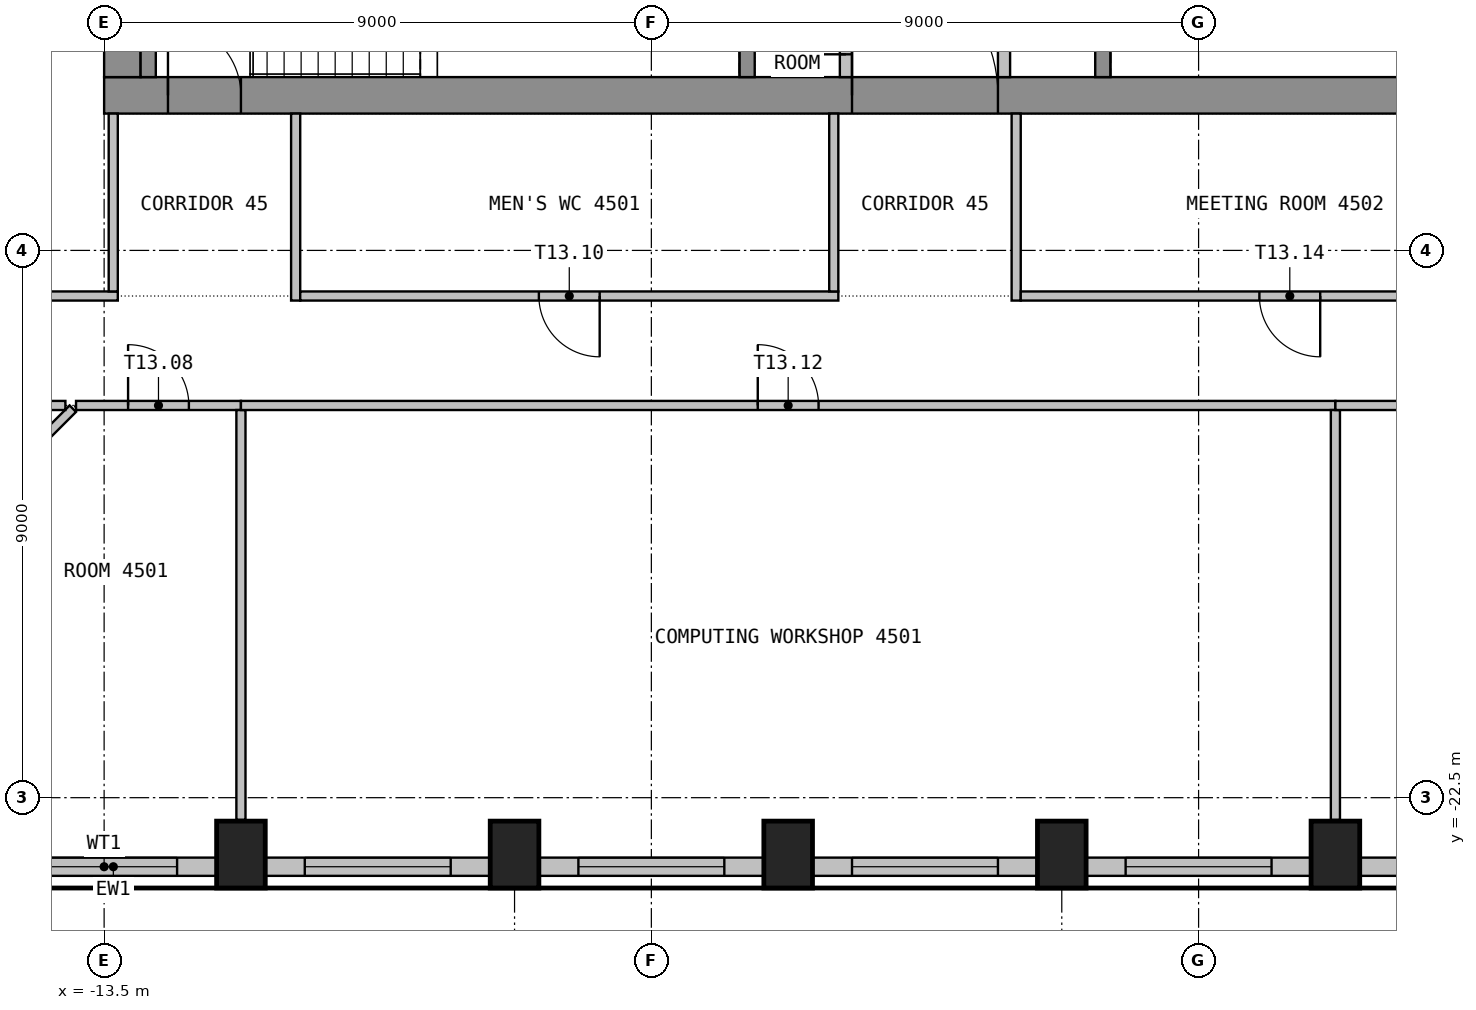
"""IFC4 building model, lengths in metres.
Left out: names, types, materials, properties, quantities, classifications, styles, units other than length and angle.
Written with IfcOpenShell. Run it as: python <this file> out.ifc"""

import sys

from ifc_helpers import new_model, si_unit, direction, frame, frame_2d, origin, origin_2d, place, context, subcontext, project, spatial, rectangle, extrude, element, fill, save


model = new_model("IFC4")
c1 = context("Model", 3, precision=1e-05, world=origin(), true_north=direction((0.0, 1.0)))
c2 = subcontext(c1, "Body", "Model", "MODEL_VIEW")
j1 = project(units=[si_unit("LENGTHUNIT", "METRE"), si_unit("PLANEANGLEUNIT", "RADIAN")], contexts=[c1])
p1 = place(None, origin())
s1 = spatial("IfcSite", under=j1, at=p1, CompositionType="ELEMENT")
p2 = place(p1, origin())
s2 = spatial("IfcBuilding", under=s1, at=p2, CompositionType="ELEMENT")
p3 = place(p2, frame((0.0, 0.0, 183.9)))
s3 = spatial("IfcBuildingStorey", under=s2, at=p3, CompositionType="ELEMENT", Elevation=183.9)
for number, where, z_axis, x_axis in (
    (1, (-11.25, -23.436, 0.0), (0.0, 0.0, 1.0), (1.0, 0.0, 0.0)),
    (2, (-6.75, -23.436, 0.0), (0.0, 0.0, 1.0), (1.0, 0.0, 0.0)),
    (3, (-2.25, -23.436, 0.0), (0.0, 0.0, 1.0), (1.0, 0.0, 0.0)),
    (4, (2.25, -23.436, 0.0), (0.0, 0.0, 1.0), (1.0, 0.0, 0.0)),
    (5, (6.75, -23.436, 0.0), (0.0, 0.0, 1.0), (1.0, 0.0, 0.0)),
):
    element("IfcColumn", number, at=place(p3, frame(where, z_axis=z_axis, x_axis=x_axis)), inside=s3, PredefinedType="COLUMN", context=c2, shape_type="SweptSolid", body=[
        extrude(rectangle(XDim=0.8, YDim=1.1, at=origin_2d()), origin(), (0.0, 0.0, 1.0), 3.55),
    ])
p4 = place(p3, frame((-15.046, -23.635, 0.0), z_axis=(0.0, 0.0, 1.0), x_axis=(1.0, 0.0, 0.0)))
e6 = element("IfcWall", 6, at=p4, inside=s3, PredefinedType="SOLIDWALL", context=c2, shape_type="SweptSolid", body=[
    extrude(rectangle(XDim=3.396, YDim=0.3, at=frame_2d((1.698, 0.0))), origin(), (0.0, 0.0, 1.0), 3.55),
])
p5 = place(p4, frame((0.346, 0.0, 0.9)))
e7 = element("IfcOpeningElement", 7, at=p5, cuts=e6, PredefinedType="OPENING", context=c2, shape_type="SweptSolid", body=[
    extrude(rectangle(XDim=2.4, YDim=2.1, at=frame_2d((1.2, 1.05))), frame((0.0, 0.16, 0.0), z_axis=(0.0, -1.0, 0.0), x_axis=(1.0, 0.0, 0.0)), (0.0, 0.0, 1.0), 0.32),
])
p6 = place(p3, frame((-10.85, -23.635, 0.0), z_axis=(0.0, 0.0, 1.0), x_axis=(1.0, 0.0, 0.0)))
e8 = element("IfcWall", 8, at=p6, inside=s3, PredefinedType="SOLIDWALL", context=c2, shape_type="SweptSolid", body=[
    extrude(rectangle(XDim=3.699, YDim=0.3, at=frame_2d((1.85, 0.0))), origin(), (0.0, 0.0, 1.0), 3.55),
])
p7 = place(p6, frame((0.649, 0.0, 0.9)))
e9 = element("IfcOpeningElement", 9, at=p7, cuts=e8, PredefinedType="OPENING", context=c2, shape_type="SweptSolid", body=[
    extrude(rectangle(XDim=2.4, YDim=2.1, at=frame_2d((1.2, 1.05))), frame((0.0, 0.16, 0.0), z_axis=(0.0, -1.0, 0.0), x_axis=(1.0, 0.0, 0.0)), (0.0, 0.0, 1.0), 0.32),
])
p8 = place(p3, frame((-6.35, -23.635, 0.0), z_axis=(0.0, 0.0, 1.0), x_axis=(1.0, 0.0, 0.0)))
e10 = element("IfcWall", 10, at=p8, inside=s3, PredefinedType="SOLIDWALL", context=c2, shape_type="SweptSolid", body=[
    extrude(rectangle(XDim=3.699, YDim=0.3, at=frame_2d((1.85, 0.0))), origin(), (0.0, 0.0, 1.0), 3.55),
])
p9 = place(p8, frame((0.649, 0.0, 0.9)))
e11 = element("IfcOpeningElement", 11, at=p9, cuts=e10, PredefinedType="OPENING", context=c2, shape_type="SweptSolid", body=[
    extrude(rectangle(XDim=2.4, YDim=2.1, at=frame_2d((1.2, 1.05))), frame((0.0, 0.16, 0.0), z_axis=(0.0, -1.0, 0.0), x_axis=(1.0, 0.0, 0.0)), (0.0, 0.0, 1.0), 0.32),
])
p10 = place(p3, frame((-1.85, -23.635, 0.0), z_axis=(0.0, 0.0, 1.0), x_axis=(1.0, 0.0, 0.0)))
e12 = element("IfcWall", 12, at=p10, inside=s3, PredefinedType="SOLIDWALL", context=c2, shape_type="SweptSolid", body=[
    extrude(rectangle(XDim=3.699, YDim=0.3, at=frame_2d((1.85, 0.0))), origin(), (0.0, 0.0, 1.0), 3.55),
])
p11 = place(p10, frame((0.649, 0.0, 0.9)))
e13 = element("IfcOpeningElement", 13, at=p11, cuts=e12, PredefinedType="OPENING", context=c2, shape_type="SweptSolid", body=[
    extrude(rectangle(XDim=2.4, YDim=2.1, at=frame_2d((1.2, 1.05))), frame((0.0, 0.16, 0.0), z_axis=(0.0, -1.0, 0.0), x_axis=(1.0, 0.0, 0.0)), (0.0, 0.0, 1.0), 0.32),
])
p12 = place(p3, frame((2.65, -23.635, 0.0), z_axis=(0.0, 0.0, 1.0), x_axis=(1.0, 0.0, 0.0)))
e14 = element("IfcWall", 14, at=p12, inside=s3, PredefinedType="SOLIDWALL", context=c2, shape_type="SweptSolid", body=[
    extrude(rectangle(XDim=3.699, YDim=0.3, at=frame_2d((1.85, 0.0))), origin(), (0.0, 0.0, 1.0), 3.55),
])
p13 = place(p12, frame((0.649, 0.0, 0.9)))
e15 = element("IfcOpeningElement", 15, at=p13, cuts=e14, PredefinedType="OPENING", context=c2, shape_type="SweptSolid", body=[
    extrude(rectangle(XDim=2.4, YDim=2.1, at=frame_2d((1.2, 1.05))), frame((0.0, 0.16, 0.0), z_axis=(0.0, -1.0, 0.0), x_axis=(1.0, 0.0, 0.0)), (0.0, 0.0, 1.0), 0.32),
])
p14 = place(p3, frame((7.15, -23.635, 0.0), z_axis=(0.0, 0.0, 1.0), x_axis=(1.0, 0.0, 0.0)))
e16 = element("IfcWall", 16, at=p14, inside=s3, PredefinedType="SOLIDWALL", context=c2, shape_type="SweptSolid", body=[
    extrude(rectangle(XDim=3.699, YDim=0.3, at=frame_2d((1.85, 0.0))), origin(), (0.0, 0.0, 1.0), 3.55),
])
p15 = place(p14, frame((0.649, 0.0, 0.9)))
e17 = element("IfcOpeningElement", 17, at=p15, cuts=e16, PredefinedType="OPENING", context=c2, shape_type="SweptSolid", body=[
    extrude(rectangle(XDim=2.4, YDim=2.1, at=frame_2d((1.2, 1.05))), frame((0.0, 0.16, 0.0), z_axis=(0.0, -1.0, 0.0), x_axis=(1.0, 0.0, 0.0)), (0.0, 0.0, 1.0), 0.32),
])
p16 = place(p3, frame((-13.5, -10.95, 0.0), z_axis=(0.0, 0.0, 1.0), x_axis=(1.0, 0.0, 0.0)))
e18 = element("IfcWall", 18, at=p16, inside=s3, PredefinedType="SHEAR", context=c2, shape_type="SweptSolid", body=[
    extrude(rectangle(XDim=27.0, YDim=0.6, at=frame_2d((13.5, 0.0))), origin(), (0.0, 0.0, 1.0), 3.55),
])
p17 = place(p16, frame((12.3, 0.0, 0.0)))
e19 = element("IfcOpeningElement", 19, at=p17, cuts=e18, PredefinedType="OPENING", context=c2, shape_type="SweptSolid", body=[
    extrude(rectangle(XDim=2.4, YDim=2.1, at=frame_2d((1.2, 1.05))), frame((0.0, 0.31, 0.0), z_axis=(0.0, -1.0, 0.0), x_axis=(1.0, 0.0, 0.0)), (0.0, 0.0, 1.0), 0.62),
])
p18 = place(p16, frame((1.05, 0.0, 0.0)))
e20 = element("IfcOpeningElement", 20, at=p18, cuts=e18, PredefinedType="OPENING", context=c2, shape_type="SweptSolid", body=[
    extrude(rectangle(XDim=1.2, YDim=2.1, at=frame_2d((0.6, 1.05))), frame((0.0, 0.31, 0.0), z_axis=(0.0, -1.0, 0.0), x_axis=(1.0, 0.0, 0.0)), (0.0, 0.0, 1.0), 0.62),
])
p19 = place(p16, frame((24.75, 0.0, 0.0)))
e21 = element("IfcOpeningElement", 21, at=p19, cuts=e18, PredefinedType="OPENING", context=c2, shape_type="SweptSolid", body=[
    extrude(rectangle(XDim=1.2, YDim=2.1, at=frame_2d((0.6, 1.05))), frame((0.0, 0.31, 0.0), z_axis=(0.0, -1.0, 0.0), x_axis=(1.0, 0.0, 0.0)), (0.0, 0.0, 1.0), 0.62),
])
p20 = place(p3, frame((-13.2, -10.65, 0.0), z_axis=(0.0, 0.0, 1.0), x_axis=(0.0, 1.0, 0.0)))
e22 = element("IfcWall", 22, at=p20, inside=s3, PredefinedType="SHEAR", context=c2, shape_type="SweptSolid", body=[
    extrude(rectangle(XDim=21.3, YDim=0.6, at=frame_2d((10.65, 0.0))), origin(), (0.0, 0.0, 1.0), 3.55),
])
p21 = place(p20, frame((9.45, 0.0, 0.0)))
e23 = element("IfcOpeningElement", 23, at=p21, cuts=e22, PredefinedType="OPENING", context=c2, shape_type="SweptSolid", body=[
    extrude(rectangle(XDim=2.4, YDim=2.1, at=frame_2d((1.2, 1.05))), frame((0.0, 0.31, 0.0), z_axis=(0.0, -1.0, 0.0), x_axis=(1.0, 0.0, 0.0)), (0.0, 0.0, 1.0), 0.62),
])
for number, where, z_axis, x_axis in (
    (24, (-12.775, -10.65, 0.0), (0.0, 0.0, 1.0), (0.0, 1.0, 0.0)),
    (25, (-2.925, -10.65, 0.0), (0.0, 0.0, 1.0), (0.0, 1.0, 0.0)),
    (26, (2.925, -10.65, 0.0), (0.0, 0.0, 1.0), (0.0, 1.0, 0.0)),
):
    element("IfcWall", number, at=place(p3, frame(where, z_axis=z_axis, x_axis=x_axis)), inside=s3, PredefinedType="SHEAR", context=c2, shape_type="SweptSolid", body=[
        extrude(rectangle(XDim=3.25, YDim=0.25, at=frame_2d((1.625, 0.0))), origin(), (0.0, 0.0, 1.0), 3.55),
    ])
p22 = place(p3, frame((-1.3, -10.65, 0.0), z_axis=(0.0, 0.0, 1.0), x_axis=(0.0, 1.0, 0.0)))
e27 = element("IfcWall", 27, at=p22, inside=s3, PredefinedType="PARTITIONING", context=c2, shape_type="SweptSolid", body=[
    extrude(rectangle(XDim=3.5, YDim=0.2, at=frame_2d((1.75, 0.0))), origin(), (0.0, 0.0, 1.0), 3.55),
])
p23 = place(p22, frame((0.375, 0.0, 0.0)))
e28 = element("IfcOpeningElement", 28, at=p23, cuts=e27, PredefinedType="OPENING", context=c2, shape_type="SweptSolid", body=[
    extrude(rectangle(XDim=0.9, YDim=2.1, at=frame_2d((0.45, 1.05))), frame((0.0, 0.11, 0.0), z_axis=(0.0, -1.0, 0.0), x_axis=(1.0, 0.0, 0.0)), (0.0, 0.0, 1.0), 0.22),
])
p24 = place(p22, frame((2.025, 0.0, 0.0)))
e29 = element("IfcOpeningElement", 29, at=p24, cuts=e27, PredefinedType="OPENING", context=c2, shape_type="SweptSolid", body=[
    extrude(rectangle(XDim=0.9, YDim=2.1, at=frame_2d((0.45, 1.05))), frame((0.0, 0.11, 0.0), z_axis=(0.0, -1.0, 0.0), x_axis=(1.0, 0.0, 0.0)), (0.0, 0.0, 1.0), 0.22),
])
p25 = place(p3, frame((1.3, -10.65, 0.0), z_axis=(0.0, 0.0, 1.0), x_axis=(0.0, 1.0, 0.0)))
e30 = element("IfcWall", 30, at=p25, inside=s3, PredefinedType="PARTITIONING", context=c2, shape_type="SweptSolid", body=[
    extrude(rectangle(XDim=3.5, YDim=0.2, at=frame_2d((1.75, 0.0))), origin(), (0.0, 0.0, 1.0), 3.55),
])
p26 = place(p25, frame((1.2, 0.0, 0.0)))
e31 = element("IfcOpeningElement", 31, at=p26, cuts=e30, PredefinedType="OPENING", context=c2, shape_type="SweptSolid", body=[
    extrude(rectangle(XDim=0.9, YDim=2.1, at=frame_2d((0.45, 1.05))), frame((0.0, 0.11, 0.0), z_axis=(0.0, -1.0, 0.0), x_axis=(1.0, 0.0, 0.0)), (0.0, 0.0, 1.0), 0.22),
])
p27 = place(p3, frame((-14.015, -16.103, 0.0), z_axis=(0.0, 0.0, 1.0), x_axis=(-0.707052104459, -0.707161453686, 0.0)))
e32 = element("IfcWall", 32, at=p27, inside=s3, PredefinedType="PARTITIONING", context=c2, shape_type="SweptSolid", body=[
    extrude(rectangle(XDim=6.698, YDim=0.15, at=frame_2d((3.349, 0.0))), origin(), (0.0, 0.0, 1.0), 3.55),
])
p28 = place(p3, frame((-18.225, -16.05, 0.0), z_axis=(0.0, 0.0, 1.0), x_axis=(1.0, 0.0, 0.0)))
e33 = element("IfcWall", 33, at=p28, inside=s3, PredefinedType="PARTITIONING", context=c2, shape_type="SweptSolid", body=[
    extrude(rectangle(XDim=4.088, YDim=0.15, at=frame_2d((2.044, 0.0))), origin(), (0.0, 0.0, 1.0), 3.55),
])
p29 = place(p3, frame((-13.275, -14.25, 0.0), z_axis=(0.0, 0.0, 1.0), x_axis=(-1.0, 0.0, 0.0)))
e34 = element("IfcWall", 34, at=p29, inside=s3, PredefinedType="PARTITIONING", context=c2, shape_type="SweptSolid", body=[
    extrude(rectangle(XDim=3.15, YDim=0.15, at=frame_2d((1.575, 0.0))), origin(), (0.0, 0.0, 1.0), 3.55),
])
p30 = place(p3, frame((-13.962, -16.05, 0.0), z_axis=(0.0, 0.0, 1.0), x_axis=(1.0, 0.0, 0.0)))
e35 = element("IfcWall", 35, at=p30, inside=s3, PredefinedType="PARTITIONING", context=c2, shape_type="SweptSolid", body=[
    extrude(rectangle(XDim=2.712, YDim=0.15, at=frame_2d((1.356, 0.0))), origin(), (0.0, 0.0, 1.0), 3.55),
])
p31 = place(p30, frame((0.856, 0.0, 0.0)))
e36 = element("IfcOpeningElement", 36, at=p31, cuts=e35, PredefinedType="OPENING", context=c2, shape_type="SweptSolid", body=[
    extrude(rectangle(XDim=1.0, YDim=2.1, at=frame_2d((0.5, 1.05))), frame((0.0, 0.085, 0.0), z_axis=(0.0, -1.0, 0.0), x_axis=(1.0, 0.0, 0.0)), (0.0, 0.0, 1.0), 0.17),
])
p32 = place(p3, frame((-13.35, -11.25, 0.0), z_axis=(0.0, 0.0, 1.0), x_axis=(0.0, -1.0, 0.0)))
e37 = element("IfcWall", 37, at=p32, inside=s3, PredefinedType="PARTITIONING", context=c2, shape_type="SweptSolid", body=[
    extrude(rectangle(XDim=2.925, YDim=0.15, at=frame_2d((1.462, 0.0))), origin(), (0.0, 0.0, 1.0), 3.55),
])
p33 = place(p3, frame((-11.25, -16.125, 0.0), z_axis=(0.0, 0.0, 1.0), x_axis=(0.0, -1.0, 0.0)))
e38 = element("IfcWall", 38, at=p33, inside=s3, PredefinedType="PARTITIONING", context=c2, shape_type="SweptSolid", body=[
    extrude(rectangle(XDim=6.74, YDim=0.15, at=frame_2d((3.37, 0.0))), origin(), (0.0, 0.0, 1.0), 3.55),
])
p34 = place(p3, frame((-11.25, -16.05, 0.0), z_axis=(0.0, 0.0, 1.0), x_axis=(1.0, 0.0, 0.0)))
e39 = element("IfcWall", 39, at=p34, inside=s3, PredefinedType="PARTITIONING", context=c2, shape_type="SweptSolid", body=[
    extrude(rectangle(XDim=18.0, YDim=0.15, at=frame_2d((9.0, 0.0))), origin(), (0.0, 0.0, 1.0), 3.55),
])
p35 = place(p34, frame((8.5, 0.0, 0.0)))
e40 = element("IfcOpeningElement", 40, at=p35, cuts=e39, PredefinedType="OPENING", context=c2, shape_type="SweptSolid", body=[
    extrude(rectangle(XDim=1.0, YDim=2.1, at=frame_2d((0.5, 1.05))), frame((0.0, 0.085, 0.0), z_axis=(0.0, -1.0, 0.0), x_axis=(1.0, 0.0, 0.0)), (0.0, 0.0, 1.0), 0.17),
])
p36 = place(p3, frame((-10.35, -14.325, 0.0), z_axis=(0.0, 0.0, 1.0), x_axis=(0.0, 1.0, 0.0)))
e41 = element("IfcWall", 41, at=p36, inside=s3, PredefinedType="PARTITIONING", context=c2, shape_type="SweptSolid", body=[
    extrude(rectangle(XDim=3.075, YDim=0.15, at=frame_2d((1.538, 0.0))), origin(), (0.0, 0.0, 1.0), 3.55),
])
p37 = place(p3, frame((-1.425, -14.25, 0.0), z_axis=(0.0, 0.0, 1.0), x_axis=(-1.0, 0.0, 0.0)))
e42 = element("IfcWall", 42, at=p37, inside=s3, PredefinedType="PARTITIONING", context=c2, shape_type="SweptSolid", body=[
    extrude(rectangle(XDim=8.85, YDim=0.15, at=frame_2d((4.425, 0.0))), origin(), (0.0, 0.0, 1.0), 3.55),
])
p38 = place(p37, frame((3.925, 0.0, 0.0)))
e43 = element("IfcOpeningElement", 43, at=p38, cuts=e42, PredefinedType="OPENING", context=c2, shape_type="SweptSolid", body=[
    extrude(rectangle(XDim=1.0, YDim=2.1, at=frame_2d((0.5, 1.05))), frame((0.0, 0.085, 0.0), z_axis=(0.0, -1.0, 0.0), x_axis=(1.0, 0.0, 0.0)), (0.0, 0.0, 1.0), 0.17),
])
p39 = place(p3, frame((-1.5, -11.25, 0.0), z_axis=(0.0, 0.0, 1.0), x_axis=(0.0, -1.0, 0.0)))
e44 = element("IfcWall", 44, at=p39, inside=s3, PredefinedType="PARTITIONING", context=c2, shape_type="SweptSolid", body=[
    extrude(rectangle(XDim=2.925, YDim=0.15, at=frame_2d((1.462, 0.0))), origin(), (0.0, 0.0, 1.0), 3.55),
])
p40 = place(p3, frame((1.5, -14.325, 0.0), z_axis=(0.0, 0.0, 1.0), x_axis=(0.0, 1.0, 0.0)))
e45 = element("IfcWall", 45, at=p40, inside=s3, PredefinedType="PARTITIONING", context=c2, shape_type="SweptSolid", body=[
    extrude(rectangle(XDim=3.075, YDim=0.15, at=frame_2d((1.538, 0.0))), origin(), (0.0, 0.0, 1.0), 3.55),
])
p41 = place(p3, frame((10.425, -14.25, 0.0), z_axis=(0.0, 0.0, 1.0), x_axis=(-1.0, 0.0, 0.0)))
e46 = element("IfcWall", 46, at=p41, inside=s3, PredefinedType="PARTITIONING", context=c2, shape_type="SweptSolid", body=[
    extrude(rectangle(XDim=8.85, YDim=0.15, at=frame_2d((4.425, 0.0))), origin(), (0.0, 0.0, 1.0), 3.55),
])
p42 = place(p41, frame((3.925, 0.0, 0.0)))
e47 = element("IfcOpeningElement", 47, at=p42, cuts=e46, PredefinedType="OPENING", context=c2, shape_type="SweptSolid", body=[
    extrude(rectangle(XDim=1.0, YDim=2.1, at=frame_2d((0.5, 1.05))), frame((0.0, 0.085, 0.0), z_axis=(0.0, -1.0, 0.0), x_axis=(1.0, 0.0, 0.0)), (0.0, 0.0, 1.0), 0.17),
])
p43 = place(p3, frame((6.75, -16.125, 0.0), z_axis=(0.0, 0.0, 1.0), x_axis=(0.0, -1.0, 0.0)))
e48 = element("IfcWall", 48, at=p43, inside=s3, PredefinedType="PARTITIONING", context=c2, shape_type="SweptSolid", body=[
    extrude(rectangle(XDim=6.74, YDim=0.15, at=frame_2d((3.37, 0.0))), origin(), (0.0, 0.0, 1.0), 3.55),
])
p44 = place(p3, frame((6.75, -16.05, 0.0), z_axis=(0.0, 0.0, 1.0), x_axis=(1.0, 0.0, 0.0)))
e49 = element("IfcWall", 49, at=p44, inside=s3, PredefinedType="PARTITIONING", context=c2, shape_type="SweptSolid", body=[
    extrude(rectangle(XDim=6.874, YDim=0.15, at=frame_2d((3.437, 0.0))), origin(), (0.0, 0.0, 1.0), 3.55),
])
p45 = place(p44, frame((2.937, 0.0, 0.0)))
e50 = element("IfcOpeningElement", 50, at=p45, cuts=e49, PredefinedType="OPENING", context=c2, shape_type="SweptSolid", body=[
    extrude(rectangle(XDim=1.0, YDim=2.1, at=frame_2d((0.5, 1.05))), frame((0.0, 0.085, 0.0), z_axis=(0.0, -1.0, 0.0), x_axis=(1.0, 0.0, 0.0)), (0.0, 0.0, 1.0), 0.17),
])
p46 = place(p5, origin())
e51 = element("IfcWindow", 51, at=p46, inside=s3, PartitioningType="SINGLE_PANEL", PredefinedType="WINDOW", context=c2, shape_type="SweptSolid", body=[
    extrude(rectangle(XDim=2.4, YDim=2.1, at=frame_2d((1.2, 1.05))), frame((0.0, 0.03, 0.0), z_axis=(0.0, -1.0, 0.0), x_axis=(1.0, 0.0, 0.0)), (0.0, 0.0, 1.0), 0.06),
])
fill(e7, e51)
p47 = place(p7, origin())
e52 = element("IfcWindow", 52, at=p47, inside=s3, PartitioningType="SINGLE_PANEL", PredefinedType="WINDOW", context=c2, shape_type="SweptSolid", body=[
    extrude(rectangle(XDim=2.4, YDim=2.1, at=frame_2d((1.2, 1.05))), frame((0.0, 0.03, 0.0), z_axis=(0.0, -1.0, 0.0), x_axis=(1.0, 0.0, 0.0)), (0.0, 0.0, 1.0), 0.06),
])
fill(e9, e52)
p48 = place(p9, origin())
e53 = element("IfcWindow", 53, at=p48, inside=s3, PartitioningType="SINGLE_PANEL", PredefinedType="WINDOW", context=c2, shape_type="SweptSolid", body=[
    extrude(rectangle(XDim=2.4, YDim=2.1, at=frame_2d((1.2, 1.05))), frame((0.0, 0.03, 0.0), z_axis=(0.0, -1.0, 0.0), x_axis=(1.0, 0.0, 0.0)), (0.0, 0.0, 1.0), 0.06),
])
fill(e11, e53)
p49 = place(p11, origin())
e54 = element("IfcWindow", 54, at=p49, inside=s3, PartitioningType="SINGLE_PANEL", PredefinedType="WINDOW", context=c2, shape_type="SweptSolid", body=[
    extrude(rectangle(XDim=2.4, YDim=2.1, at=frame_2d((1.2, 1.05))), frame((0.0, 0.03, 0.0), z_axis=(0.0, -1.0, 0.0), x_axis=(1.0, 0.0, 0.0)), (0.0, 0.0, 1.0), 0.06),
])
fill(e13, e54)
p50 = place(p13, origin())
e55 = element("IfcWindow", 55, at=p50, inside=s3, PartitioningType="SINGLE_PANEL", PredefinedType="WINDOW", context=c2, shape_type="SweptSolid", body=[
    extrude(rectangle(XDim=2.4, YDim=2.1, at=frame_2d((1.2, 1.05))), frame((0.0, 0.03, 0.0), z_axis=(0.0, -1.0, 0.0), x_axis=(1.0, 0.0, 0.0)), (0.0, 0.0, 1.0), 0.06),
])
fill(e15, e55)
p51 = place(p17, origin())
e56 = element("IfcDoor", 56, at=p51, inside=s3, OperationType="DOUBLE_DOOR_DOUBLE_SWING", PredefinedType="DOOR", context=c2, shape_type="SweptSolid", body=[
    extrude(rectangle(XDim=2.4, YDim=2.1, at=frame_2d((1.2, 1.05))), frame((0.0, 0.025, 0.0), z_axis=(0.0, -1.0, 0.0), x_axis=(1.0, 0.0, 0.0)), (0.0, 0.0, 1.0), 0.05),
])
fill(e19, e56)
p52 = place(p18, origin())
e57 = element("IfcDoor", 57, at=p52, inside=s3, OperationType="SINGLE_SWING_RIGHT", PredefinedType="DOOR", context=c2, shape_type="SweptSolid", body=[
    extrude(rectangle(XDim=1.2, YDim=2.1, at=frame_2d((0.6, 1.05))), frame((0.0, 0.025, 0.0), z_axis=(0.0, -1.0, 0.0), x_axis=(1.0, 0.0, 0.0)), (0.0, 0.0, 1.0), 0.05),
])
fill(e20, e57)
p53 = place(p23, origin())
e58 = element("IfcDoor", 58, at=p53, inside=s3, OperationType="SINGLE_SWING_LEFT", PredefinedType="DOOR", context=c2, shape_type="SweptSolid", body=[
    extrude(rectangle(XDim=0.9, YDim=2.1, at=frame_2d((0.45, 1.05))), frame((0.0, 0.025, 0.0), z_axis=(0.0, -1.0, 0.0), x_axis=(1.0, 0.0, 0.0)), (0.0, 0.0, 1.0), 0.05),
])
fill(e28, e58)
p54 = place(p31, origin())
e59 = element("IfcDoor", 59, at=p54, inside=s3, OperationType="SINGLE_SWING_LEFT", PredefinedType="DOOR", context=c2, shape_type="SweptSolid", body=[
    extrude(rectangle(XDim=1.0, YDim=2.1, at=frame_2d((0.5, 1.05))), frame((0.0, 0.025, 0.0), z_axis=(0.0, -1.0, 0.0), x_axis=(1.0, 0.0, 0.0)), (0.0, 0.0, 1.0), 0.05),
])
fill(e36, e59)
p55 = place(p38, origin())
e60 = element("IfcDoor", 60, at=p55, inside=s3, OperationType="SINGLE_SWING_RIGHT", PredefinedType="DOOR", context=c2, shape_type="SweptSolid", body=[
    extrude(rectangle(XDim=1.0, YDim=2.1, at=frame_2d((0.5, 1.05))), frame((0.0, 0.025, 0.0), z_axis=(0.0, -1.0, 0.0), x_axis=(1.0, 0.0, 0.0)), (0.0, 0.0, 1.0), 0.05),
])
fill(e43, e60)
p56 = place(p35, origin())
e61 = element("IfcDoor", 61, at=p56, inside=s3, OperationType="SINGLE_SWING_RIGHT", PredefinedType="DOOR", context=c2, shape_type="SweptSolid", body=[
    extrude(rectangle(XDim=1.0, YDim=2.1, at=frame_2d((0.5, 1.05))), frame((0.0, 0.025, 0.0), z_axis=(0.0, -1.0, 0.0), x_axis=(1.0, 0.0, 0.0)), (0.0, 0.0, 1.0), 0.05),
])
fill(e40, e61)
p57 = place(p42, origin())
e62 = element("IfcDoor", 62, at=p57, inside=s3, OperationType="SINGLE_SWING_RIGHT", PredefinedType="DOOR", context=c2, shape_type="SweptSolid", body=[
    extrude(rectangle(XDim=1.0, YDim=2.1, at=frame_2d((0.5, 1.05))), frame((0.0, 0.025, 0.0), z_axis=(0.0, -1.0, 0.0), x_axis=(1.0, 0.0, 0.0)), (0.0, 0.0, 1.0), 0.05),
])
fill(e47, e62)
save(model, sys.argv[1])
